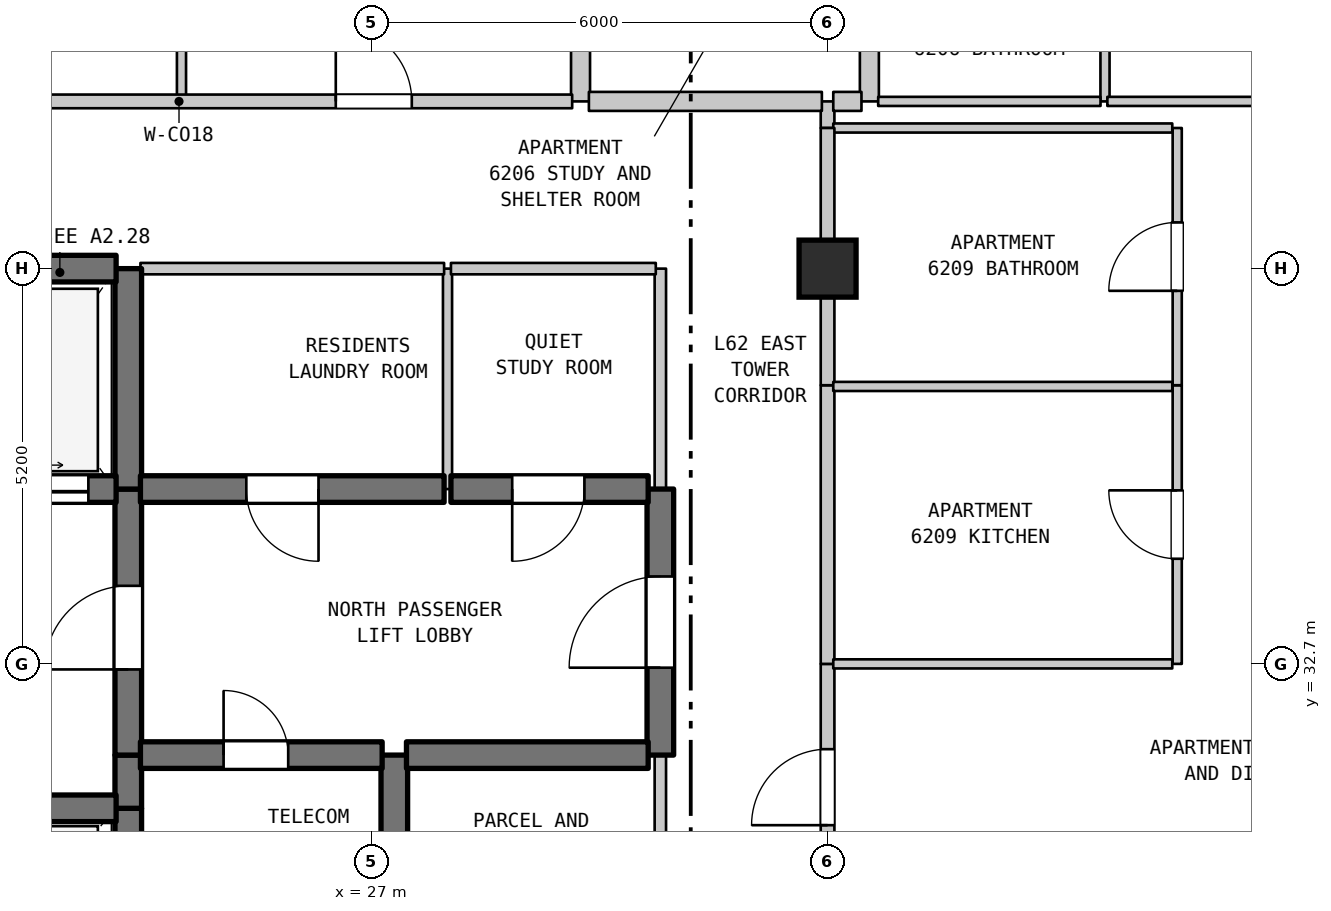
"""IFC4 building model, lengths in metres.
Left out: names, types, materials, properties, quantities, classifications, styles, units other than length and angle.
Written with IfcOpenShell. Run it as: python <this file> out.ifc"""

import sys

from ifc_helpers import new_model, si_unit, direction, frame, frame_2d, origin, origin_2d, place, context, subcontext, project, spatial, rectangle, extrude, element, fill, save


model = new_model("IFC4")
c1 = context("Model", 3, precision=1e-05, world=origin(), true_north=direction((0.0, 1.0)))
c2 = subcontext(c1, "Body", "Model", "MODEL_VIEW")
j1 = project(units=[si_unit("LENGTHUNIT", "METRE"), si_unit("PLANEANGLEUNIT", "RADIAN")], contexts=[c1])
p1 = place(None, origin())
s1 = spatial("IfcSite", under=j1, at=p1, CompositionType="ELEMENT")
p2 = place(p1, origin())
s2 = spatial("IfcBuilding", under=s1, at=p2, CompositionType="ELEMENT")
p3 = place(p2, frame((0.0, 0.0, 251.0)))
s3 = spatial("IfcBuildingStorey", under=s2, at=p3, CompositionType="ELEMENT", Elevation=251.0)
p4 = place(p3, frame((33.0, 37.9, 0.0), z_axis=(0.0, 0.0, 1.0), x_axis=(1.0, 0.0, 0.0)))
e1 = element("IfcColumn", 1, at=p4, inside=s3, PredefinedType="COLUMN", context=c2, shape_type="SweptSolid", body=[
    extrude(rectangle(XDim=0.75, YDim=0.75, at=origin_2d()), origin(), (0.0, 0.0, 1.0), 3.7),
])
p5 = place(p3, frame((23.8, 28.2, 0.0), z_axis=(0.0, 0.0, 1.0), x_axis=(0.0, 1.0, 0.0)))
e2 = element("IfcWall", 2, at=p5, inside=s3, PredefinedType="SHEAR", context=c2, shape_type="SweptSolid", body=[
    extrude(rectangle(XDim=2.6, YDim=0.35, at=frame_2d((1.3, 0.0))), origin(), (0.0, 0.0, 1.0), 3.39),
])
p6 = place(p3, frame((23.8, 30.8, 0.0), z_axis=(0.0, 0.0, 1.0), x_axis=(0.0, 1.0, 0.0)))
e3 = element("IfcWall", 3, at=p6, inside=s3, PredefinedType="SHEAR", context=c2, shape_type="SweptSolid", body=[
    extrude(rectangle(XDim=0.7, YDim=0.35, at=frame_2d((0.35, 0.0))), origin(), (0.0, 0.0, 1.0), 3.39),
])
p7 = place(p3, frame((23.8, 31.5, 0.0), z_axis=(0.0, 0.0, 1.0), x_axis=(0.0, 1.0, 0.0)))
e4 = element("IfcWall", 4, at=p7, inside=s3, PredefinedType="SHEAR", context=c2, shape_type="SweptSolid", body=[
    extrude(rectangle(XDim=3.5, YDim=0.35, at=frame_2d((1.75, 0.0))), origin(), (0.0, 0.0, 1.0), 3.39),
])
p8 = place(p7, frame((1.127, 0.0, 0.0)))
e5 = element("IfcOpeningElement", 5, at=p8, cuts=e4, PredefinedType="OPENING", context=c2, shape_type="SweptSolid", body=[
    extrude(rectangle(XDim=1.1, YDim=2.15, at=frame_2d((0.55, 1.075))), frame((0.0, 0.185, 0.0), z_axis=(0.0, -1.0, 0.0), x_axis=(1.0, 0.0, 0.0)), (0.0, 0.0, 1.0), 0.37),
])
p9 = place(p3, frame((23.8, 35.0, 0.0), z_axis=(0.0, 0.0, 1.0), x_axis=(0.0, 1.0, 0.0)))
e6 = element("IfcWall", 6, at=p9, inside=s3, PredefinedType="SHEAR", context=c2, shape_type="SweptSolid", body=[
    extrude(rectangle(XDim=2.9, YDim=0.35, at=frame_2d((1.45, 0.0))), origin(), (0.0, 0.0, 1.0), 3.39),
])
p10 = place(p3, frame((24.5, 40.1, 0.0), z_axis=(0.0, 0.0, 1.0), x_axis=(0.0, 1.0, 0.0)))
e7 = element("IfcWall", 7, at=p10, inside=s3, PredefinedType="PARTITIONING", context=c2, shape_type="SweptSolid", body=[
    extrude(rectangle(XDim=2.05, YDim=0.12, at=frame_2d((1.025, 0.0))), origin(), (0.0, 0.0, 1.0), 3.39),
])
p11 = place(p3, frame((27.3, 28.9, 0.0), z_axis=(0.0, 0.0, 1.0), x_axis=(0.0, 1.0, 0.0)))
e8 = element("IfcWall", 8, at=p11, inside=s3, PredefinedType="SHEAR", context=c2, shape_type="SweptSolid", body=[
    extrude(rectangle(XDim=2.6, YDim=0.35, at=frame_2d((1.3, 0.0))), origin(), (0.0, 0.0, 1.0), 3.39),
])
p12 = place(p3, frame((28.0, 35.0, 0.0), z_axis=(0.0, 0.0, 1.0), x_axis=(0.0, 1.0, 0.0)))
e9 = element("IfcWall", 9, at=p12, inside=s3, PredefinedType="PARTITIONING", context=c2, shape_type="SweptSolid", body=[
    extrude(rectangle(XDim=2.9, YDim=0.12, at=frame_2d((1.45, 0.0))), origin(), (0.0, 0.0, 1.0), 3.39),
])
p13 = place(p3, frame((29.75, 40.1, 0.0), z_axis=(0.0, 0.0, 1.0), x_axis=(0.0, 1.0, 0.0)))
e10 = element("IfcWall", 10, at=p13, inside=s3, PredefinedType="STANDARD", context=c2, shape_type="SweptSolid", body=[
    extrude(rectangle(XDim=2.3, YDim=0.25, at=frame_2d((1.15, 0.0))), origin(), (0.0, 0.0, 1.0), 3.39),
])
p14 = place(p3, frame((30.8, 28.9, 0.0), z_axis=(0.0, 0.0, 1.0), x_axis=(0.0, 1.0, 0.0)))
e11 = element("IfcWall", 11, at=p14, inside=s3, PredefinedType="STANDARD", context=c2, shape_type="SweptSolid", body=[
    extrude(rectangle(XDim=2.6, YDim=0.15, at=frame_2d((1.3, 0.0))), origin(), (0.0, 0.0, 1.0), 3.39),
])
p15 = place(p3, frame((30.8, 31.5, 0.0), z_axis=(0.0, 0.0, 1.0), x_axis=(0.0, 1.0, 0.0)))
e12 = element("IfcWall", 12, at=p15, inside=s3, PredefinedType="SHEAR", context=c2, shape_type="SweptSolid", body=[
    extrude(rectangle(XDim=3.5, YDim=0.35, at=frame_2d((1.75, 0.0))), origin(), (0.0, 0.0, 1.0), 3.39),
])
p16 = place(p15, frame((1.15, 0.0, 0.0)))
e13 = element("IfcOpeningElement", 13, at=p16, cuts=e12, PredefinedType="OPENING", context=c2, shape_type="SweptSolid", body=[
    extrude(rectangle(XDim=1.2, YDim=2.2, at=frame_2d((0.6, 1.1))), frame((0.0, 0.185, 0.0), z_axis=(0.0, -1.0, 0.0), x_axis=(1.0, 0.0, 0.0)), (0.0, 0.0, 1.0), 0.37),
])
p17 = place(p3, frame((30.8, 35.0, 0.0), z_axis=(0.0, 0.0, 1.0), x_axis=(0.0, 1.0, 0.0)))
e14 = element("IfcWall", 14, at=p17, inside=s3, PredefinedType="STANDARD", context=c2, shape_type="SweptSolid", body=[
    extrude(rectangle(XDim=2.9, YDim=0.15, at=frame_2d((1.45, 0.0))), origin(), (0.0, 0.0, 1.0), 3.39),
])
p18 = place(p3, frame((33.0, 29.6, 0.0), z_axis=(0.0, 0.0, 1.0), x_axis=(0.0, 1.0, 0.0)))
e15 = element("IfcWall", 15, at=p18, inside=s3, PredefinedType="STANDARD", context=c2, shape_type="SweptSolid", body=[
    extrude(rectangle(XDim=3.1, YDim=0.18, at=frame_2d((1.55, 0.0))), origin(), (0.0, 0.0, 1.0), 2.89),
])
p19 = place(p18, frame((0.978, 0.0, 0.0)))
e16 = element("IfcOpeningElement", 16, at=p19, cuts=e15, PredefinedType="OPENING", context=c2, shape_type="SweptSolid", body=[
    extrude(rectangle(XDim=1.0, YDim=2.15, at=frame_2d((0.5, 1.075))), frame((0.0, 0.1, 0.0), z_axis=(0.0, -1.0, 0.0), x_axis=(1.0, 0.0, 0.0)), (0.0, 0.0, 1.0), 0.2),
])
p20 = place(p3, frame((33.0, 32.7, 0.0), z_axis=(0.0, 0.0, 1.0), x_axis=(0.0, 1.0, 0.0)))
e17 = element("IfcWall", 17, at=p20, inside=s3, PredefinedType="STANDARD", context=c2, shape_type="SweptSolid", body=[
    extrude(rectangle(XDim=3.666, YDim=0.18, at=frame_2d((1.833, 0.0))), origin(), (0.0, 0.0, 1.0), 2.89),
])
p21 = place(p3, frame((33.0, 36.366, 0.0), z_axis=(0.0, 0.0, 1.0), x_axis=(0.0, 1.0, 0.0)))
e18 = element("IfcWall", 18, at=p21, inside=s3, PredefinedType="STANDARD", context=c2, shape_type="SweptSolid", body=[
    extrude(rectangle(XDim=1.534, YDim=0.18, at=frame_2d((0.767, 0.0))), origin(), (0.0, 0.0, 1.0), 2.89),
])
p22 = place(p3, frame((33.0, 39.75, 0.0), z_axis=(0.0, 0.0, 1.0), x_axis=(0.0, 1.0, 0.0)))
e19 = element("IfcWall", 19, at=p22, inside=s3, PredefinedType="STANDARD", context=c2, shape_type="SweptSolid", body=[
    extrude(rectangle(XDim=0.35, YDim=0.18, at=frame_2d((0.175, 0.0))), origin(), (0.0, 0.0, 1.0), 3.39),
])
p23 = place(p3, frame((33.55, 40.1, 0.0), z_axis=(0.0, 0.0, 1.0), x_axis=(0.0, 1.0, 0.0)))
e20 = element("IfcWall", 20, at=p23, inside=s3, PredefinedType="STANDARD", context=c2, shape_type="SweptSolid", body=[
    extrude(rectangle(XDim=2.3, YDim=0.25, at=frame_2d((1.15, 0.0))), origin(), (0.0, 0.0, 1.0), 3.39),
])
p24 = place(p3, frame((36.65, 40.1, 0.0), z_axis=(0.0, 0.0, 1.0), x_axis=(0.0, 1.0, 0.0)))
e21 = element("IfcWall", 21, at=p24, inside=s3, PredefinedType="PARTITIONING", context=c2, shape_type="SweptSolid", body=[
    extrude(rectangle(XDim=2.3, YDim=0.12, at=frame_2d((1.15, 0.0))), origin(), (0.0, 0.0, 1.0), 3.39),
])
p25 = place(p3, frame((37.6, 32.7, 0.0), z_axis=(0.0, 0.0, 1.0), x_axis=(0.0, 1.0, 0.0)))
e22 = element("IfcWall", 22, at=p25, inside=s3, PredefinedType="PARTITIONING", context=c2, shape_type="SweptSolid", body=[
    extrude(rectangle(XDim=3.666, YDim=0.12, at=frame_2d((1.833, 0.0))), origin(), (0.0, 0.0, 1.0), 3.39),
])
p26 = place(p25, frame((1.383, 0.0, 0.0)))
e23 = element("IfcOpeningElement", 23, at=p26, cuts=e22, PredefinedType="OPENING", context=c2, shape_type="SweptSolid", body=[
    extrude(rectangle(XDim=0.9, YDim=2.15, at=frame_2d((0.45, 1.075))), frame((0.0, 0.07, 0.0), z_axis=(0.0, -1.0, 0.0), x_axis=(1.0, 0.0, 0.0)), (0.0, 0.0, 1.0), 0.14),
])
p27 = place(p3, frame((37.6, 36.366, 0.0), z_axis=(0.0, 0.0, 1.0), x_axis=(0.0, 1.0, 0.0)))
e24 = element("IfcWall", 24, at=p27, inside=s3, PredefinedType="PARTITIONING", context=c2, shape_type="SweptSolid", body=[
    extrude(rectangle(XDim=3.384, YDim=0.12, at=frame_2d((1.692, 0.0))), origin(), (0.0, 0.0, 1.0), 3.39),
])
p28 = place(p27, frame((1.242, 0.0, 0.0)))
e25 = element("IfcOpeningElement", 25, at=p28, cuts=e24, PredefinedType="OPENING", context=c2, shape_type="SweptSolid", body=[
    extrude(rectangle(XDim=0.9, YDim=2.1, at=frame_2d((0.45, 1.05))), frame((0.0, 0.07, 0.0), z_axis=(0.0, -1.0, 0.0), x_axis=(1.0, 0.0, 0.0)), (0.0, 0.0, 1.0), 0.14),
])
p29 = place(p3, frame((19.16, 30.8, 0.0), z_axis=(0.0, 0.0, 1.0), x_axis=(1.0, 0.0, 0.0)))
e26 = element("IfcWall", 26, at=p29, inside=s3, PredefinedType="SHEAR", context=c2, shape_type="SweptSolid", body=[
    extrude(rectangle(XDim=4.48, YDim=0.35, at=frame_2d((2.24, 0.0))), origin(), (0.0, 0.0, 1.0), 3.39),
])
p30 = place(p3, frame((23.96, 31.5, 0.0), z_axis=(0.0, 0.0, 1.0), x_axis=(1.0, 0.0, 0.0)))
e27 = element("IfcWall", 27, at=p30, inside=s3, PredefinedType="SHEAR", context=c2, shape_type="SweptSolid", body=[
    extrude(rectangle(XDim=3.18, YDim=0.35, at=frame_2d((1.59, 0.0))), origin(), (0.0, 0.0, 1.0), 3.39),
])
p31 = place(p30, frame((1.094, 0.0, 0.0)))
e28 = element("IfcOpeningElement", 28, at=p31, cuts=e27, PredefinedType="OPENING", context=c2, shape_type="SweptSolid", body=[
    extrude(rectangle(XDim=0.85, YDim=2.1, at=frame_2d((0.425, 1.05))), frame((0.0, 0.185, 0.0), z_axis=(0.0, -1.0, 0.0), x_axis=(1.0, 0.0, 0.0)), (0.0, 0.0, 1.0), 0.37),
])
p32 = place(p3, frame((27.46, 31.5, 0.0), z_axis=(0.0, 0.0, 1.0), x_axis=(1.0, 0.0, 0.0)))
e29 = element("IfcWall", 29, at=p32, inside=s3, PredefinedType="SHEAR", context=c2, shape_type="SweptSolid", body=[
    extrude(rectangle(XDim=3.18, YDim=0.35, at=frame_2d((1.59, 0.0))), origin(), (0.0, 0.0, 1.0), 3.39),
])
p33 = place(p3, frame((33.075, 32.7, 0.0), z_axis=(0.0, 0.0, 1.0), x_axis=(1.0, 0.0, 0.0)))
e30 = element("IfcWall", 30, at=p33, inside=s3, PredefinedType="PARTITIONING", context=c2, shape_type="SweptSolid", body=[
    extrude(rectangle(XDim=4.46, YDim=0.12, at=frame_2d((2.23, 0.0))), origin(), (0.0, 0.0, 1.0), 3.39),
])
p34 = place(p3, frame((19.16, 35.0, 0.0), z_axis=(0.0, 0.0, 1.0), x_axis=(1.0, 0.0, 0.0)))
e31 = element("IfcWall", 31, at=p34, inside=s3, PredefinedType="SHEAR", context=c2, shape_type="SweptSolid", body=[
    extrude(rectangle(XDim=4.48, YDim=0.35, at=frame_2d((2.24, 0.0))), origin(), (0.0, 0.0, 1.0), 3.39),
])
p35 = place(p34, frame((0.365, 0.0, 0.0)))
e32 = element("IfcOpeningElement", 32, at=p35, cuts=e31, PredefinedType="OPENING", context=c2, shape_type="SweptSolid", body=[
    extrude(rectangle(XDim=1.35, YDim=2.2, at=frame_2d((0.675, 1.1))), frame((0.0, 0.185, 0.0), z_axis=(0.0, -1.0, 0.0), x_axis=(1.0, 0.0, 0.0)), (0.0, 0.0, 1.0), 0.37),
])
p36 = place(p34, frame((2.765, 0.0, 0.0)))
e33 = element("IfcOpeningElement", 33, at=p36, cuts=e31, PredefinedType="OPENING", context=c2, shape_type="SweptSolid", body=[
    extrude(rectangle(XDim=1.35, YDim=2.2, at=frame_2d((0.675, 1.1))), frame((0.0, 0.185, 0.0), z_axis=(0.0, -1.0, 0.0), x_axis=(1.0, 0.0, 0.0)), (0.0, 0.0, 1.0), 0.37),
])
p37 = place(p3, frame((23.96, 35.0, 0.0), z_axis=(0.0, 0.0, 1.0), x_axis=(1.0, 0.0, 0.0)))
e34 = element("IfcWall", 34, at=p37, inside=s3, PredefinedType="SHEAR", context=c2, shape_type="SweptSolid", body=[
    extrude(rectangle(XDim=3.995, YDim=0.35, at=frame_2d((1.998, 0.0))), origin(), (0.0, 0.0, 1.0), 3.39),
])
p38 = place(p37, frame((1.393, 0.0, 0.0)))
e35 = element("IfcOpeningElement", 35, at=p38, cuts=e34, PredefinedType="OPENING", context=c2, shape_type="SweptSolid", body=[
    extrude(rectangle(XDim=0.95, YDim=2.15, at=frame_2d((0.475, 1.075))), frame((0.0, 0.185, 0.0), z_axis=(0.0, -1.0, 0.0), x_axis=(1.0, 0.0, 0.0)), (0.0, 0.0, 1.0), 0.37),
])
p39 = place(p3, frame((28.045, 35.0, 0.0), z_axis=(0.0, 0.0, 1.0), x_axis=(1.0, 0.0, 0.0)))
e36 = element("IfcWall", 36, at=p39, inside=s3, PredefinedType="SHEAR", context=c2, shape_type="SweptSolid", body=[
    extrude(rectangle(XDim=2.595, YDim=0.35, at=frame_2d((1.297, 0.0))), origin(), (0.0, 0.0, 1.0), 3.39),
])
p40 = place(p39, frame((0.806, 0.0, 0.0)))
e37 = element("IfcOpeningElement", 37, at=p40, cuts=e36, PredefinedType="OPENING", context=c2, shape_type="SweptSolid", body=[
    extrude(rectangle(XDim=0.95, YDim=2.15, at=frame_2d((0.475, 1.075))), frame((0.0, 0.185, 0.0), z_axis=(0.0, -1.0, 0.0), x_axis=(1.0, 0.0, 0.0)), (0.0, 0.0, 1.0), 0.37),
])
p41 = place(p3, frame((33.075, 36.35, 0.0), z_axis=(0.0, 0.0, 1.0), x_axis=(1.0, 0.0, 0.0)))
e38 = element("IfcWall", 38, at=p41, inside=s3, PredefinedType="PARTITIONING", context=c2, shape_type="SweptSolid", body=[
    extrude(rectangle(XDim=4.46, YDim=0.12, at=frame_2d((2.23, 0.0))), origin(), (0.0, 0.0, 1.0), 3.39),
])
p42 = place(p3, frame((19.16, 37.9, 0.0), z_axis=(0.0, 0.0, 1.0), x_axis=(1.0, 0.0, 0.0)))
e39 = element("IfcWall", 39, at=p42, inside=s3, PredefinedType="SHEAR", context=c2, shape_type="SweptSolid", body=[
    extrude(rectangle(XDim=4.48, YDim=0.35, at=frame_2d((2.24, 0.0))), origin(), (0.0, 0.0, 1.0), 3.39),
])
p43 = place(p3, frame((23.96, 37.9, 0.0), z_axis=(0.0, 0.0, 1.0), x_axis=(1.0, 0.0, 0.0)))
e40 = element("IfcWall", 40, at=p43, inside=s3, PredefinedType="STANDARD", context=c2, shape_type="SweptSolid", body=[
    extrude(rectangle(XDim=3.995, YDim=0.15, at=frame_2d((1.998, 0.0))), origin(), (0.0, 0.0, 1.0), 2.89),
])
p44 = place(p3, frame((28.045, 37.9, 0.0), z_axis=(0.0, 0.0, 1.0), x_axis=(1.0, 0.0, 0.0)))
e41 = element("IfcWall", 41, at=p44, inside=s3, PredefinedType="STANDARD", context=c2, shape_type="SweptSolid", body=[
    extrude(rectangle(XDim=2.695, YDim=0.15, at=frame_2d((1.348, 0.0))), origin(), (0.0, 0.0, 1.0), 2.89),
])
p45 = place(p3, frame((33.075, 39.75, 0.0), z_axis=(0.0, 0.0, 1.0), x_axis=(1.0, 0.0, 0.0)))
e42 = element("IfcWall", 42, at=p45, inside=s3, PredefinedType="PARTITIONING", context=c2, shape_type="SweptSolid", body=[
    extrude(rectangle(XDim=4.46, YDim=0.12, at=frame_2d((2.23, 0.0))), origin(), (0.0, 0.0, 1.0), 3.39),
])
p46 = place(p3, frame((19.295, 40.1, 0.0), z_axis=(0.0, 0.0, 1.0), x_axis=(1.0, 0.0, 0.0)))
e43 = element("IfcWall", 43, at=p46, inside=s3, PredefinedType="STANDARD", context=c2, shape_type="SweptSolid", body=[
    extrude(rectangle(XDim=10.345, YDim=0.18, at=frame_2d((5.172, 0.0))), origin(), (0.0, 0.0, 1.0), 3.39),
])
p47 = place(p46, frame((2.035, 0.0, 0.0)))
e44 = element("IfcOpeningElement", 44, at=p47, cuts=e43, PredefinedType="OPENING", context=c2, shape_type="SweptSolid", body=[
    extrude(rectangle(XDim=1.0, YDim=2.15, at=frame_2d((0.5, 1.075))), frame((0.0, 0.1, 0.0), z_axis=(0.0, -1.0, 0.0), x_axis=(1.0, 0.0, 0.0)), (0.0, 0.0, 1.0), 0.2),
])
p48 = place(p46, frame((7.235, 0.0, 0.0)))
e45 = element("IfcOpeningElement", 45, at=p48, cuts=e43, PredefinedType="OPENING", context=c2, shape_type="SweptSolid", body=[
    extrude(rectangle(XDim=1.0, YDim=2.15, at=frame_2d((0.5, 1.075))), frame((0.0, 0.1, 0.0), z_axis=(0.0, -1.0, 0.0), x_axis=(1.0, 0.0, 0.0)), (0.0, 0.0, 1.0), 0.2),
])
p49 = place(p3, frame((29.86, 40.1, 0.0), z_axis=(0.0, 0.0, 1.0), x_axis=(1.0, 0.0, 0.0)))
e46 = element("IfcWall", 46, at=p49, inside=s3, PredefinedType="STANDARD", context=c2, shape_type="SweptSolid", body=[
    extrude(rectangle(XDim=3.065, YDim=0.25, at=frame_2d((1.532, 0.0))), origin(), (0.0, 0.0, 1.0), 3.39),
])
p50 = place(p3, frame((33.075, 40.1, 0.0), z_axis=(0.0, 0.0, 1.0), x_axis=(1.0, 0.0, 0.0)))
e47 = element("IfcWall", 47, at=p50, inside=s3, PredefinedType="STANDARD", context=c2, shape_type="SweptSolid", body=[
    extrude(rectangle(XDim=0.371, YDim=0.25, at=frame_2d((0.186, 0.0))), origin(), (0.0, 0.0, 1.0), 3.39),
])
p51 = place(p3, frame((33.666, 40.1, 0.0), z_axis=(0.0, 0.0, 1.0), x_axis=(1.0, 0.0, 0.0)))
e48 = element("IfcWall", 48, at=p51, inside=s3, PredefinedType="PARTITIONING", context=c2, shape_type="SweptSolid", body=[
    extrude(rectangle(XDim=2.925, YDim=0.12, at=frame_2d((1.462, 0.0))), origin(), (0.0, 0.0, 1.0), 3.39),
])
p52 = place(p3, frame((36.681, 40.1, 0.0), z_axis=(0.0, 0.0, 1.0), x_axis=(1.0, 0.0, 0.0)))
e49 = element("IfcWall", 49, at=p52, inside=s3, PredefinedType="PARTITIONING", context=c2, shape_type="SweptSolid", body=[
    extrude(rectangle(XDim=3.694, YDim=0.12, at=frame_2d((1.847, 0.0))), origin(), (0.0, 0.0, 1.0), 3.39),
])
p53 = place(p3, frame((33.0, 37.9, 0.0), z_axis=(0.0, 0.0, 1.0), x_axis=(0.0, 1.0, 0.0)))
e50 = element("IfcWall", 50, at=p53, inside=s3, PredefinedType="STANDARD", context=c2, shape_type="SweptSolid", body=[
    extrude(rectangle(XDim=1.85, YDim=0.18, at=frame_2d((0.925, 0.0))), origin(), (0.0, 0.0, 1.0), 2.79),
])
p54 = place(p8, origin())
e51 = element("IfcDoor", 51, at=p54, inside=s3, OperationType="SINGLE_SWING_LEFT", PredefinedType="DOOR", context=c2, shape_type="SweptSolid", body=[
    extrude(rectangle(XDim=1.1, YDim=2.15, at=frame_2d((0.55, 1.075))), frame((0.0, 0.025, 0.0), z_axis=(0.0, -1.0, 0.0), x_axis=(1.0, 0.0, 0.0)), (0.0, 0.0, 1.0), 0.05),
])
fill(e5, e51)
p55 = place(p16, origin())
e52 = element("IfcDoor", 52, at=p55, inside=s3, OperationType="SINGLE_SWING_LEFT", PredefinedType="DOOR", context=c2, shape_type="SweptSolid", body=[
    extrude(rectangle(XDim=1.2, YDim=2.2, at=frame_2d((0.6, 1.1))), frame((0.0, 0.025, 0.0), z_axis=(0.0, -1.0, 0.0), x_axis=(1.0, 0.0, 0.0)), (0.0, 0.0, 1.0), 0.05),
])
fill(e13, e52)
p56 = place(p19, origin())
e53 = element("IfcDoor", 53, at=p56, inside=s3, OperationType="SINGLE_SWING_LEFT", PredefinedType="DOOR", context=c2, shape_type="SweptSolid", body=[
    extrude(rectangle(XDim=1.0, YDim=2.15, at=frame_2d((0.5, 1.075))), frame((0.0, 0.025, 0.0), z_axis=(0.0, -1.0, 0.0), x_axis=(1.0, 0.0, 0.0)), (0.0, 0.0, 1.0), 0.05),
])
fill(e16, e53)
p57 = place(p26, origin())
e54 = element("IfcDoor", 54, at=p57, inside=s3, OperationType="SINGLE_SWING_RIGHT", PredefinedType="DOOR", context=c2, shape_type="SweptSolid", body=[
    extrude(rectangle(XDim=0.9, YDim=2.15, at=frame_2d((0.45, 1.075))), frame((0.0, 0.025, 0.0), z_axis=(0.0, -1.0, 0.0), x_axis=(1.0, 0.0, 0.0)), (0.0, 0.0, 1.0), 0.05),
])
fill(e23, e54)
p58 = place(p28, origin())
e55 = element("IfcDoor", 55, at=p58, inside=s3, OperationType="SINGLE_SWING_LEFT", PredefinedType="DOOR", context=c2, shape_type="SweptSolid", body=[
    extrude(rectangle(XDim=0.9, YDim=2.1, at=frame_2d((0.45, 1.05))), frame((0.0, 0.025, 0.0), z_axis=(0.0, -1.0, 0.0), x_axis=(1.0, 0.0, 0.0)), (0.0, 0.0, 1.0), 0.05),
])
fill(e25, e55)
p59 = place(p31, origin())
e56 = element("IfcDoor", 56, at=p59, inside=s3, OperationType="SINGLE_SWING_LEFT", PredefinedType="DOOR", context=c2, shape_type="SweptSolid", body=[
    extrude(rectangle(XDim=0.85, YDim=2.1, at=frame_2d((0.425, 1.05))), frame((0.0, 0.025, 0.0), z_axis=(0.0, -1.0, 0.0), x_axis=(1.0, 0.0, 0.0)), (0.0, 0.0, 1.0), 0.05),
])
fill(e28, e56)
p60 = place(p36, origin())
e57 = element("IfcDoor", 57, at=p60, inside=s3, OperationType="DOUBLE_DOOR_SLIDING", PredefinedType="DOOR", context=c2, shape_type="SweptSolid", body=[
    extrude(rectangle(XDim=1.35, YDim=2.2, at=frame_2d((0.675, 1.1))), frame((0.0, 0.025, 0.0), z_axis=(0.0, -1.0, 0.0), x_axis=(1.0, 0.0, 0.0)), (0.0, 0.0, 1.0), 0.05),
])
fill(e33, e57)
p61 = place(p38, frame((0.95, 0.0, 0.0), z_axis=(0.0, 0.0, 1.0), x_axis=(-1.0, 0.0, 0.0)))
e58 = element("IfcDoor", 58, at=p61, inside=s3, OperationType="SINGLE_SWING_RIGHT", PredefinedType="DOOR", context=c2, shape_type="SweptSolid", body=[
    extrude(rectangle(XDim=0.95, YDim=2.15, at=frame_2d((0.475, 1.075))), frame((0.0, 0.025, 0.0), z_axis=(0.0, -1.0, 0.0), x_axis=(1.0, 0.0, 0.0)), (0.0, 0.0, 1.0), 0.05),
])
fill(e35, e58)
p62 = place(p40, frame((0.95, 0.0, 0.0), z_axis=(0.0, 0.0, 1.0), x_axis=(-1.0, 0.0, 0.0)))
e59 = element("IfcDoor", 59, at=p62, inside=s3, OperationType="SINGLE_SWING_LEFT", PredefinedType="DOOR", context=c2, shape_type="SweptSolid", body=[
    extrude(rectangle(XDim=0.95, YDim=2.15, at=frame_2d((0.475, 1.075))), frame((0.0, 0.025, 0.0), z_axis=(0.0, -1.0, 0.0), x_axis=(1.0, 0.0, 0.0)), (0.0, 0.0, 1.0), 0.05),
])
fill(e37, e59)
p63 = place(p48, origin())
e60 = element("IfcDoor", 60, at=p63, inside=s3, OperationType="SINGLE_SWING_LEFT", PredefinedType="DOOR", context=c2, shape_type="SweptSolid", body=[
    extrude(rectangle(XDim=1.0, YDim=2.15, at=frame_2d((0.5, 1.075))), frame((0.0, 0.025, 0.0), z_axis=(0.0, -1.0, 0.0), x_axis=(1.0, 0.0, 0.0)), (0.0, 0.0, 1.0), 0.05),
])
fill(e45, e60)
save(model, sys.argv[1])
